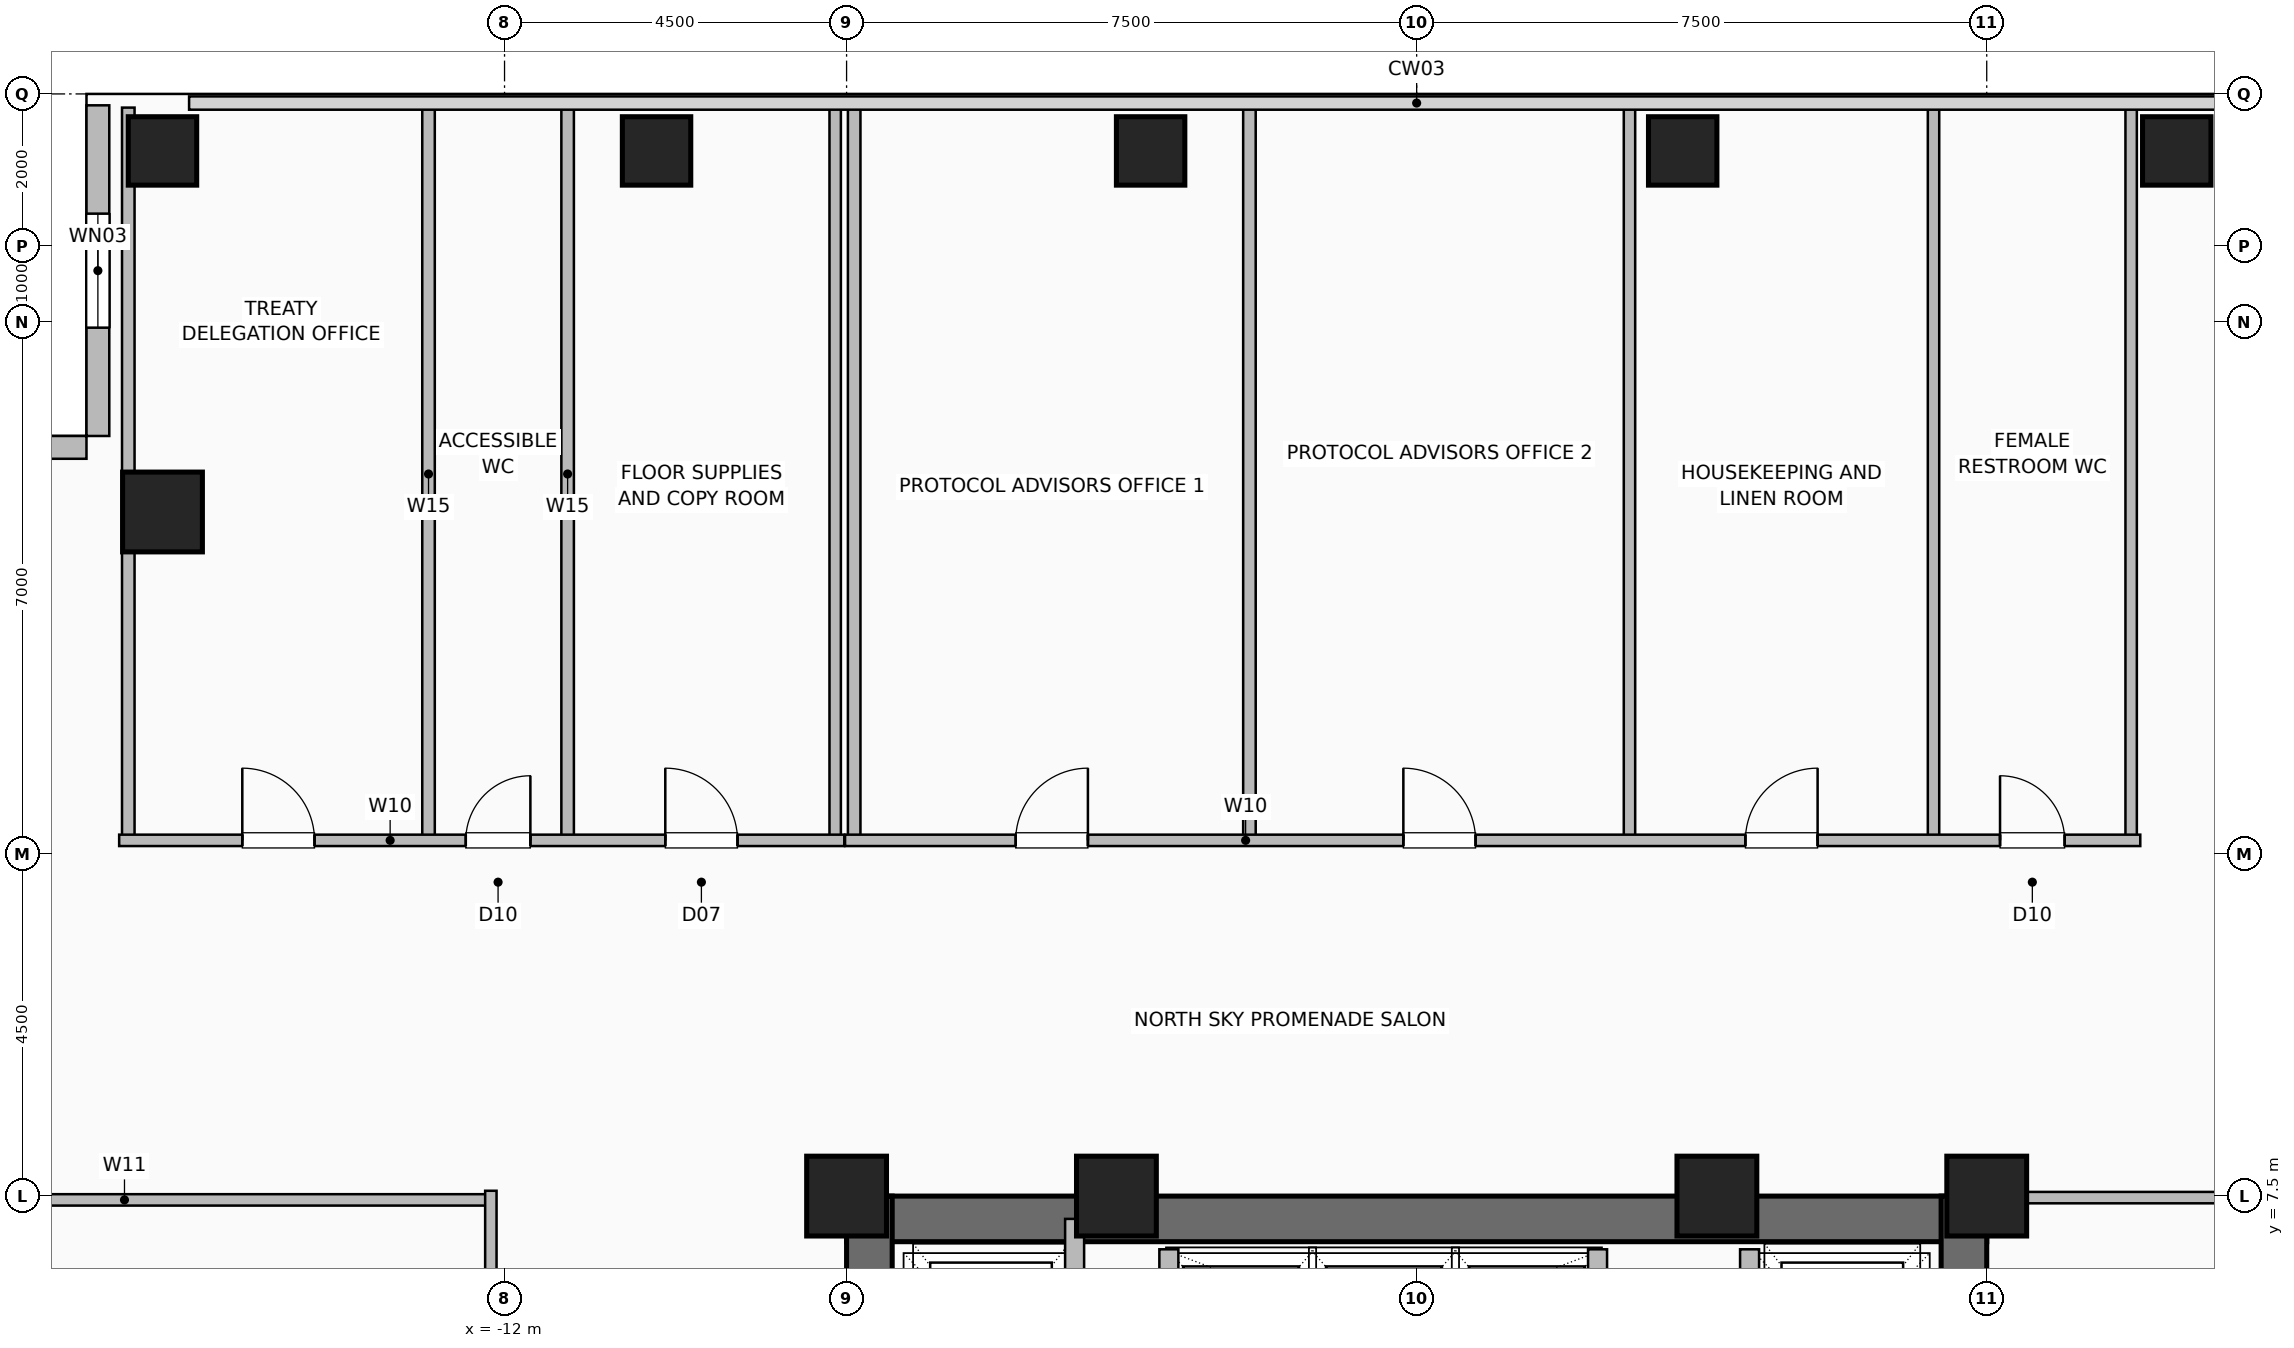
"""IFC4 building model, lengths in metres.
Left out: names, types, materials, properties, quantities, classifications, styles, units other than length and angle.
Written with IfcOpenShell. Run it as: python <this file> out.ifc"""

import sys

from ifc_helpers import new_model, si_unit, direction, frame, frame_2d, origin, origin_2d, place, context, subcontext, project, spatial, rectangle, hollow_rectangle, extrude, element, fill, save


model = new_model("IFC4")
c1 = context("Model", 3, precision=1e-05, world=origin(), true_north=direction((0.0, 1.0)))
c2 = subcontext(c1, "Body", "Model", "MODEL_VIEW")
j1 = project(units=[si_unit("LENGTHUNIT", "METRE"), si_unit("PLANEANGLEUNIT", "RADIAN")], contexts=[c1])
p1 = place(None, origin())
s1 = spatial("IfcSite", under=j1, at=p1, CompositionType="ELEMENT")
p2 = place(p1, origin())
s2 = spatial("IfcBuilding", under=s1, at=p2, CompositionType="ELEMENT")
p3 = place(p2, frame((0.0, 0.0, 151.6)))
s3 = spatial("IfcBuildingStorey", under=s2, at=p3, CompositionType="ELEMENT", Elevation=151.6)
for number, where, z_axis, x_axis in (
    (1, (7.5, 7.5, 0.0), (0.0, 0.0, 1.0), (1.0, 0.0, 0.0)),
    (2, (3.95, 7.5, 0.0), (0.0, 0.0, 1.0), (1.0, 0.0, 0.0)),
    (3, (-3.95, 7.5, 0.0), (0.0, 0.0, 1.0), (1.0, 0.0, 0.0)),
    (4, (-7.5, 7.5, 0.0), (0.0, 0.0, 1.0), (1.0, 0.0, 0.0)),
):
    element("IfcColumn", number, at=place(p3, frame(where, z_axis=z_axis, x_axis=x_axis)), inside=s3, PredefinedType="COLUMN", context=c2, shape_type="SweptSolid", body=[
        extrude(hollow_rectangle(XDim=1.05, YDim=1.05, WallThickness=0.05, at=origin_2d()), origin(), (0.0, 0.0, 1.0), 3.6),
    ])
for number, where, z_axis, x_axis in (
    (5, (-16.5, 21.25, 0.0), (0.0, 0.0, 1.0), (1.0, 0.0, 0.0)),
    (6, (-10.0, 21.25, 0.0), (0.0, 0.0, 1.0), (1.0, 0.0, 0.0)),
    (7, (-3.5, 21.25, 0.0), (0.0, 0.0, 1.0), (1.0, 0.0, 0.0)),
    (8, (3.5, 21.25, 0.0), (0.0, 0.0, 1.0), (1.0, 0.0, 0.0)),
    (9, (10.0, 21.25, 0.0), (0.0, 0.0, 1.0), (1.0, 0.0, 0.0)),
):
    element("IfcColumn", number, at=place(p3, frame(where, z_axis=z_axis, x_axis=x_axis)), inside=s3, PredefinedType="COLUMN", context=c2, shape_type="SweptSolid", body=[
        extrude(hollow_rectangle(XDim=0.9, YDim=0.9, WallThickness=0.045, at=origin_2d()), origin(), (0.0, 0.0, 1.0), 3.6),
    ])
p4 = place(p3, frame((-16.5, 16.5, 0.0), z_axis=(0.0, 0.0, 1.0), x_axis=(1.0, 0.0, 0.0)))
e10 = element("IfcColumn", 10, at=p4, inside=s3, PredefinedType="COLUMN", context=c2, shape_type="SweptSolid", body=[
    extrude(hollow_rectangle(XDim=1.05, YDim=1.05, WallThickness=0.05, at=origin_2d()), origin(), (0.0, 0.0, 1.0), 3.6),
])
p5 = place(p3, frame((-17.35, 21.85, 0.0), z_axis=(0.0, 0.0, 1.0), x_axis=(0.0, -1.0, 0.0)))
e11 = element("IfcWall", 11, at=p5, inside=s3, PredefinedType="SOLIDWALL", context=c2, shape_type="SweptSolid", body=[
    extrude(rectangle(XDim=4.35, YDim=0.3, at=frame_2d((2.175, 0.0))), origin(), (0.0, 0.0, 1.0), 3.25),
])
p6 = place(p5, frame((1.425, 0.0, 0.9)))
e12 = element("IfcOpeningElement", 12, at=p6, cuts=e11, PredefinedType="OPENING", context=c2, shape_type="SweptSolid", body=[
    extrude(rectangle(XDim=1.5, YDim=1.8, at=frame_2d((0.75, 0.9))), frame((0.0, 0.16, 0.0), z_axis=(0.0, -1.0, 0.0), x_axis=(1.0, 0.0, 0.0)), (0.0, 0.0, 1.0), 0.32),
])
p7 = place(p3, frame((-21.85, 17.35, 0.0), z_axis=(0.0, 0.0, 1.0), x_axis=(1.0, 0.0, 0.0)))
e13 = element("IfcWall", 13, at=p7, inside=s3, PredefinedType="SOLIDWALL", context=c2, shape_type="SweptSolid", body=[
    extrude(rectangle(XDim=4.35, YDim=0.3, at=frame_2d((2.175, 0.0))), origin(), (0.0, 0.0, 1.0), 3.25),
])
p8 = place(p3, frame((-7.5, 7.2, 0.0), z_axis=(0.0, 0.0, 1.0), x_axis=(1.0, 0.0, 0.0)))
e14 = element("IfcWall", 14, at=p8, inside=s3, PredefinedType="SHEAR", context=c2, shape_type="SweptSolid", body=[
    extrude(rectangle(XDim=15.0, YDim=0.6, at=frame_2d((7.5, 0.0))), origin(), (0.0, 0.0, 1.0), 3.25),
])
p9 = place(p3, frame((-7.2, -7.5, 0.0), z_axis=(0.0, 0.0, 1.0), x_axis=(0.0, 1.0, 0.0)))
e15 = element("IfcWall", 15, at=p9, inside=s3, PredefinedType="SHEAR", context=c2, shape_type="SweptSolid", body=[
    extrude(rectangle(XDim=15.0, YDim=0.6, at=frame_2d((7.5, 0.0))), origin(), (0.0, 0.0, 1.0), 3.25),
])
p10 = place(p9, frame((9.5, 0.0, 0.0)))
e16 = element("IfcOpeningElement", 16, at=p10, cuts=e15, PredefinedType="OPENING", context=c2, shape_type="SweptSolid", body=[
    extrude(rectangle(XDim=1.0, YDim=2.08, at=frame_2d((0.5, 1.04))), frame((0.0, 0.31, 0.0), z_axis=(0.0, -1.0, 0.0), x_axis=(1.0, 0.0, 0.0)), (0.0, 0.0, 1.0), 0.62),
])
p11 = place(p3, frame((7.2, -7.5, 0.0), z_axis=(0.0, 0.0, 1.0), x_axis=(0.0, 1.0, 0.0)))
e17 = element("IfcWall", 17, at=p11, inside=s3, PredefinedType="SHEAR", context=c2, shape_type="SweptSolid", body=[
    extrude(rectangle(XDim=15.0, YDim=0.6, at=frame_2d((7.5, 0.0))), origin(), (0.0, 0.0, 1.0), 3.25),
])
for number, where, z_axis, x_axis in (
    (18, (-3.26, 4.58, 0.0), (0.0, 0.0, 1.0), (0.0, 1.0, 0.0)),
    (19, (2.38, 4.58, 0.0), (0.0, 0.0, 1.0), (0.0, 1.0, 0.0)),
):
    element("IfcWall", number, at=place(p3, frame(where, z_axis=z_axis, x_axis=x_axis)), inside=s3, PredefinedType="SHEAR", context=c2, shape_type="SweptSolid", body=[
        extrude(rectangle(XDim=2.22, YDim=0.25, at=frame_2d((1.11, 0.0))), origin(), (0.0, 0.0, 1.0), 3.25),
    ])
p12 = place(p3, frame((-4.5, 4.35, 0.0), z_axis=(0.0, 0.0, 1.0), x_axis=(0.0, 1.0, 0.0)))
e20 = element("IfcWall", 20, at=p12, inside=s3, PredefinedType="SHEAR", context=c2, shape_type="SweptSolid", body=[
    extrude(rectangle(XDim=2.85, YDim=0.25, at=frame_2d((1.425, 0.0))), origin(), (0.0, 0.0, 1.0), 3.25),
])
p13 = place(p3, frame((4.38, 4.3, 0.0), z_axis=(0.0, 0.0, 1.0), x_axis=(0.0, 1.0, 0.0)))
e21 = element("IfcWall", 21, at=p13, inside=s3, PredefinedType="SHEAR", context=c2, shape_type="SweptSolid", body=[
    extrude(rectangle(XDim=2.5, YDim=0.25, at=frame_2d((1.25, 0.0))), origin(), (0.0, 0.0, 1.0), 3.25),
])
p14 = place(p13, frame((0.8, 0.0, 0.0)))
e22 = element("IfcOpeningElement", 22, at=p14, cuts=e21, PredefinedType="OPENING", context=c2, shape_type="SweptSolid", body=[
    extrude(rectangle(XDim=1.2, YDim=2.2, at=frame_2d((0.6, 1.1))), frame((0.0, 0.135, 0.0), z_axis=(0.0, -1.0, 0.0), x_axis=(1.0, 0.0, 0.0)), (0.0, 0.0, 1.0), 0.27),
])
p15 = place(p3, frame((-21.82, 7.45, 0.0), z_axis=(0.0, 0.0, 1.0), x_axis=(1.0, 0.0, 0.0)))
e23 = element("IfcWall", 23, at=p15, inside=s3, PredefinedType="PARTITIONING", context=c2, shape_type="SweptSolid", body=[
    extrude(rectangle(XDim=9.64, YDim=0.15, at=frame_2d((4.82, 0.0))), origin(), (0.0, 0.0, 1.0), 3.25),
])
p16 = place(p3, frame((-12.18, -7.57, 0.0), z_axis=(0.0, 0.0, 1.0), x_axis=(0.0, 1.0, 0.0)))
e24 = element("IfcWall", 24, at=p16, inside=s3, PredefinedType="PARTITIONING", context=c2, shape_type="SweptSolid", body=[
    extrude(rectangle(XDim=15.14, YDim=0.15, at=frame_2d((7.57, 0.0))), origin(), (0.0, 0.0, 1.0), 3.25),
])
p17 = place(p16, frame((4.17, 0.0, 0.0)))
e25 = element("IfcOpeningElement", 25, at=p17, cuts=e24, PredefinedType="OPENING", context=c2, shape_type="SweptSolid", body=[
    extrude(rectangle(XDim=0.95, YDim=2.06, at=frame_2d((0.475, 1.03))), frame((0.0, 0.085, 0.0), z_axis=(0.0, -1.0, 0.0), x_axis=(1.0, 0.0, 0.0)), (0.0, 0.0, 1.0), 0.17),
])
p18 = place(p16, frame((11.62, 0.0, 0.0)))
e26 = element("IfcOpeningElement", 26, at=p18, cuts=e24, PredefinedType="OPENING", context=c2, shape_type="SweptSolid", body=[
    extrude(rectangle(XDim=0.95, YDim=2.06, at=frame_2d((0.475, 1.03))), frame((0.0, 0.085, 0.0), z_axis=(0.0, -1.0, 0.0), x_axis=(1.0, 0.0, 0.0)), (0.0, 0.0, 1.0), 0.17),
])
for number, where, z_axis, x_axis in (
    (27, (-11.17, 12.18, 0.0), (0.0, 0.0, 1.0), (0.0, 1.0, 0.0)),
    (28, (-16.95, 12.18, 0.0), (0.0, 0.0, 1.0), (0.0, 1.0, 0.0)),
    (29, (-13.0, 12.18, 0.0), (0.0, 0.0, 1.0), (0.0, 1.0, 0.0)),
):
    element("IfcWall", number, at=place(p3, frame(where, z_axis=z_axis, x_axis=x_axis)), inside=s3, PredefinedType="PLUMBINGWALL", context=c2, shape_type="SweptSolid", body=[
        extrude(rectangle(XDim=9.64, YDim=0.165, at=frame_2d((4.82, 0.0))), origin(), (0.0, 0.0, 1.0), 3.25),
    ])
p19 = place(p3, frame((-7.65, 12.18, 0.0), z_axis=(0.0, 0.0, 1.0), x_axis=(0.0, 1.0, 0.0)))
e30 = element("IfcWall", 30, at=p19, inside=s3, PredefinedType="PARTITIONING", context=c2, shape_type="SweptSolid", body=[
    extrude(rectangle(XDim=9.64, YDim=0.15, at=frame_2d((4.82, 0.0))), origin(), (0.0, 0.0, 1.0), 3.25),
])
p20 = place(p3, frame((-17.07, 12.18, 0.0), z_axis=(0.0, 0.0, 1.0), x_axis=(1.0, 0.0, 0.0)))
e31 = element("IfcWall", 31, at=p20, inside=s3, PredefinedType="PARTITIONING", context=c2, shape_type="SweptSolid", body=[
    extrude(rectangle(XDim=9.54, YDim=0.15, at=frame_2d((4.77, 0.0))), origin(), (0.0, 0.0, 1.0), 3.25),
])
p21 = place(p20, frame((1.62, 0.0, 0.0)))
e32 = element("IfcOpeningElement", 32, at=p21, cuts=e31, PredefinedType="OPENING", context=c2, shape_type="SweptSolid", body=[
    extrude(rectangle(XDim=0.95, YDim=2.06, at=frame_2d((0.475, 1.03))), frame((0.0, 0.085, 0.0), z_axis=(0.0, -1.0, 0.0), x_axis=(1.0, 0.0, 0.0)), (0.0, 0.0, 1.0), 0.17),
])
p22 = place(p20, frame((4.56, 0.0, 0.0)))
e33 = element("IfcOpeningElement", 33, at=p22, cuts=e31, PredefinedType="OPENING", context=c2, shape_type="SweptSolid", body=[
    extrude(rectangle(XDim=0.85, YDim=2.05, at=frame_2d((0.425, 1.025))), frame((0.0, 0.085, 0.0), z_axis=(0.0, -1.0, 0.0), x_axis=(1.0, 0.0, 0.0)), (0.0, 0.0, 1.0), 0.17),
])
p23 = place(p20, frame((7.185, 0.0, 0.0)))
e34 = element("IfcOpeningElement", 34, at=p23, cuts=e31, PredefinedType="OPENING", context=c2, shape_type="SweptSolid", body=[
    extrude(rectangle(XDim=0.95, YDim=2.06, at=frame_2d((0.475, 1.03))), frame((0.0, 0.085, 0.0), z_axis=(0.0, -1.0, 0.0), x_axis=(1.0, 0.0, 0.0)), (0.0, 0.0, 1.0), 0.17),
])
for number, where, z_axis, x_axis in (
    (35, (-7.4, 12.18, 0.0), (0.0, 0.0, 1.0), (0.0, 1.0, 0.0)),
    (36, (-2.2, 12.18, 0.0), (0.0, 0.0, 1.0), (0.0, 1.0, 0.0)),
):
    element("IfcWall", number, at=place(p3, frame(where, z_axis=z_axis, x_axis=x_axis)), inside=s3, PredefinedType="PLUMBINGWALL", context=c2, shape_type="SweptSolid", body=[
        extrude(rectangle(XDim=9.64, YDim=0.165, at=frame_2d((4.82, 0.0))), origin(), (0.0, 0.0, 1.0), 3.25),
    ])
for number, where, z_axis, x_axis in (
    (37, (2.8, 12.18, 0.0), (0.0, 0.0, 1.0), (0.0, 1.0, 0.0)),
    (38, (6.8, 12.18, 0.0), (0.0, 0.0, 1.0), (0.0, 1.0, 0.0)),
    (39, (9.4, 12.18, 0.0), (0.0, 0.0, 1.0), (0.0, 1.0, 0.0)),
):
    element("IfcWall", number, at=place(p3, frame(where, z_axis=z_axis, x_axis=x_axis)), inside=s3, PredefinedType="PARTITIONING", context=c2, shape_type="SweptSolid", body=[
        extrude(rectangle(XDim=9.64, YDim=0.15, at=frame_2d((4.82, 0.0))), origin(), (0.0, 0.0, 1.0), 3.25),
    ])
p24 = place(p3, frame((-7.52, 12.18, 0.0), z_axis=(0.0, 0.0, 1.0), x_axis=(1.0, 0.0, 0.0)))
e40 = element("IfcWall", 40, at=p24, inside=s3, PredefinedType="PARTITIONING", context=c2, shape_type="SweptSolid", body=[
    extrude(rectangle(XDim=17.04, YDim=0.15, at=frame_2d((8.52, 0.0))), origin(), (0.0, 0.0, 1.0), 3.25),
])
p25 = place(p24, frame((2.245, 0.0, 0.0)))
e41 = element("IfcOpeningElement", 41, at=p25, cuts=e40, PredefinedType="OPENING", context=c2, shape_type="SweptSolid", body=[
    extrude(rectangle(XDim=0.95, YDim=2.06, at=frame_2d((0.475, 1.03))), frame((0.0, 0.085, 0.0), z_axis=(0.0, -1.0, 0.0), x_axis=(1.0, 0.0, 0.0)), (0.0, 0.0, 1.0), 0.17),
])
p26 = place(p24, frame((7.345, 0.0, 0.0)))
e42 = element("IfcOpeningElement", 42, at=p26, cuts=e40, PredefinedType="OPENING", context=c2, shape_type="SweptSolid", body=[
    extrude(rectangle(XDim=0.95, YDim=2.06, at=frame_2d((0.475, 1.03))), frame((0.0, 0.085, 0.0), z_axis=(0.0, -1.0, 0.0), x_axis=(1.0, 0.0, 0.0)), (0.0, 0.0, 1.0), 0.17),
])
p27 = place(p24, frame((11.845, 0.0, 0.0)))
e43 = element("IfcOpeningElement", 43, at=p27, cuts=e40, PredefinedType="OPENING", context=c2, shape_type="SweptSolid", body=[
    extrude(rectangle(XDim=0.95, YDim=2.06, at=frame_2d((0.475, 1.03))), frame((0.0, 0.085, 0.0), z_axis=(0.0, -1.0, 0.0), x_axis=(1.0, 0.0, 0.0)), (0.0, 0.0, 1.0), 0.17),
])
p28 = place(p24, frame((15.195, 0.0, 0.0)))
e44 = element("IfcOpeningElement", 44, at=p28, cuts=e40, PredefinedType="OPENING", context=c2, shape_type="SweptSolid", body=[
    extrude(rectangle(XDim=0.85, YDim=2.05, at=frame_2d((0.425, 1.025))), frame((0.0, 0.085, 0.0), z_axis=(0.0, -1.0, 0.0), x_axis=(1.0, 0.0, 0.0)), (0.0, 0.0, 1.0), 0.17),
])
p29 = place(p3, frame((7.6, 7.48, 0.0), z_axis=(0.0, 0.0, 1.0), x_axis=(1.0, 0.0, 0.0)))
e45 = element("IfcWall", 45, at=p29, inside=s3, PredefinedType="PARTITIONING", context=c2, shape_type="SweptSolid", body=[
    extrude(rectangle(XDim=14.22, YDim=0.15, at=frame_2d((7.11, 0.0))), origin(), (0.0, 0.0, 1.0), 3.25),
])
p30 = place(p6, origin())
e46 = element("IfcWindow", 46, at=p30, inside=s3, PartitioningType="SINGLE_PANEL", PredefinedType="WINDOW", context=c2, shape_type="SweptSolid", body=[
    extrude(rectangle(XDim=1.5, YDim=1.8, at=frame_2d((0.75, 0.9))), frame((0.0, 0.03, 0.0), z_axis=(0.0, -1.0, 0.0), x_axis=(1.0, 0.0, 0.0)), (0.0, 0.0, 1.0), 0.06),
])
fill(e12, e46)
p31 = place(p21, origin())
e47 = element("IfcDoor", 47, at=p31, inside=s3, OperationType="SINGLE_SWING_LEFT", PredefinedType="DOOR", context=c2, shape_type="SweptSolid", body=[
    extrude(rectangle(XDim=0.95, YDim=2.06, at=frame_2d((0.475, 1.03))), frame((0.0, 0.025, 0.0), z_axis=(0.0, -1.0, 0.0), x_axis=(1.0, 0.0, 0.0)), (0.0, 0.0, 1.0), 0.05),
])
fill(e32, e47)
p32 = place(p22, origin())
e48 = element("IfcDoor", 48, at=p32, inside=s3, OperationType="SINGLE_SWING_RIGHT", PredefinedType="DOOR", context=c2, shape_type="SweptSolid", body=[
    extrude(rectangle(XDim=0.85, YDim=2.05, at=frame_2d((0.425, 1.025))), frame((0.0, 0.025, 0.0), z_axis=(0.0, -1.0, 0.0), x_axis=(1.0, 0.0, 0.0)), (0.0, 0.0, 1.0), 0.05),
])
fill(e33, e48)
p33 = place(p23, origin())
e49 = element("IfcDoor", 49, at=p33, inside=s3, OperationType="SINGLE_SWING_LEFT", PredefinedType="DOOR", context=c2, shape_type="SweptSolid", body=[
    extrude(rectangle(XDim=0.95, YDim=2.06, at=frame_2d((0.475, 1.03))), frame((0.0, 0.025, 0.0), z_axis=(0.0, -1.0, 0.0), x_axis=(1.0, 0.0, 0.0)), (0.0, 0.0, 1.0), 0.05),
])
fill(e34, e49)
p34 = place(p25, origin())
e50 = element("IfcDoor", 50, at=p34, inside=s3, OperationType="SINGLE_SWING_RIGHT", PredefinedType="DOOR", context=c2, shape_type="SweptSolid", body=[
    extrude(rectangle(XDim=0.95, YDim=2.06, at=frame_2d((0.475, 1.03))), frame((0.0, 0.025, 0.0), z_axis=(0.0, -1.0, 0.0), x_axis=(1.0, 0.0, 0.0)), (0.0, 0.0, 1.0), 0.05),
])
fill(e41, e50)
p35 = place(p26, origin())
e51 = element("IfcDoor", 51, at=p35, inside=s3, OperationType="SINGLE_SWING_LEFT", PredefinedType="DOOR", context=c2, shape_type="SweptSolid", body=[
    extrude(rectangle(XDim=0.95, YDim=2.06, at=frame_2d((0.475, 1.03))), frame((0.0, 0.025, 0.0), z_axis=(0.0, -1.0, 0.0), x_axis=(1.0, 0.0, 0.0)), (0.0, 0.0, 1.0), 0.05),
])
fill(e42, e51)
p36 = place(p27, origin())
e52 = element("IfcDoor", 52, at=p36, inside=s3, OperationType="SINGLE_SWING_RIGHT", PredefinedType="DOOR", context=c2, shape_type="SweptSolid", body=[
    extrude(rectangle(XDim=0.95, YDim=2.06, at=frame_2d((0.475, 1.03))), frame((0.0, 0.025, 0.0), z_axis=(0.0, -1.0, 0.0), x_axis=(1.0, 0.0, 0.0)), (0.0, 0.0, 1.0), 0.05),
])
fill(e43, e52)
p37 = place(p28, origin())
e53 = element("IfcDoor", 53, at=p37, inside=s3, OperationType="SINGLE_SWING_LEFT", PredefinedType="DOOR", context=c2, shape_type="SweptSolid", body=[
    extrude(rectangle(XDim=0.85, YDim=2.05, at=frame_2d((0.425, 1.025))), frame((0.0, 0.025, 0.0), z_axis=(0.0, -1.0, 0.0), x_axis=(1.0, 0.0, 0.0)), (0.0, 0.0, 1.0), 0.05),
])
fill(e44, e53)
save(model, sys.argv[1])
